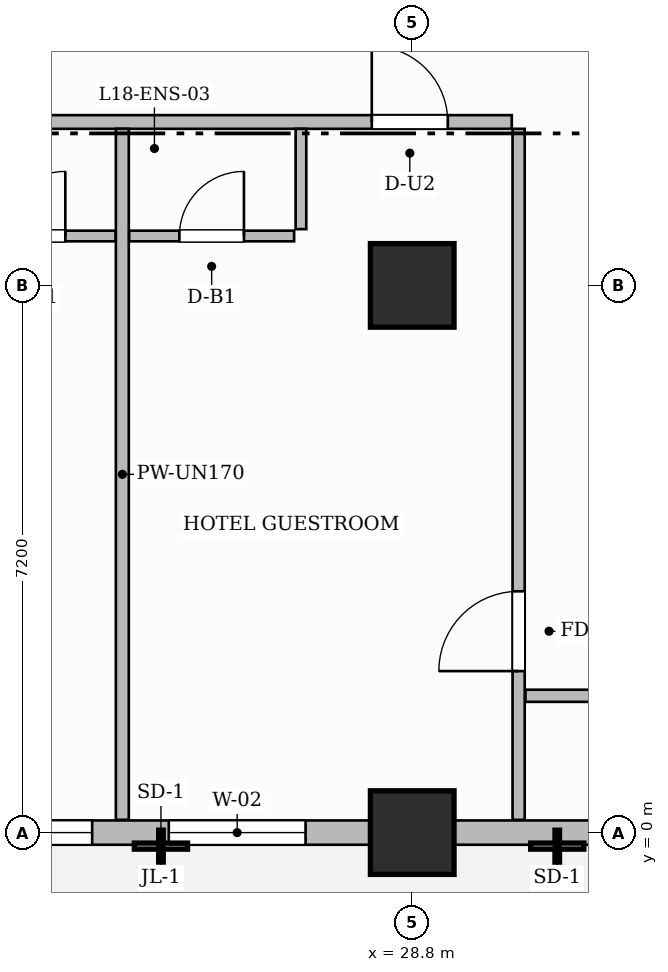
"""IFC4 building model, lengths in metres.
Left out: names, types, materials, properties, quantities, classifications, styles, units other than length and angle.
Written with IfcOpenShell. Run it as: python <this file> out.ifc"""

import sys

from ifc_helpers import new_model, si_unit, direction, frame, frame_2d, origin, origin_2d, place, context, subcontext, project, spatial, rectangle, extrude, source, transform, mapped, element, fill, save


model = new_model("IFC4")
c1 = context("Model", 3, precision=1e-05, world=origin(), true_north=direction((0.0, 1.0)))
c2 = subcontext(c1, "Body", "Model", "MODEL_VIEW")
j1 = project(units=[si_unit("LENGTHUNIT", "METRE"), si_unit("PLANEANGLEUNIT", "RADIAN")], contexts=[c1])
p1 = place(None, origin())
s1 = spatial("IfcSite", under=j1, at=p1, CompositionType="ELEMENT")
p2 = place(p1, origin())
s2 = spatial("IfcBuilding", under=s1, at=p2, CompositionType="ELEMENT")
p3 = place(p2, frame((0.0, 0.0, 76.8)))
s3 = spatial("IfcBuildingStorey", under=s2, at=p3, CompositionType="ELEMENT", Elevation=76.8)
m1 = source(origin(), c2, "Body", "SweptSolid", [
    extrude(rectangle(XDim=1.1, YDim=1.1, at=origin_2d()), origin(), (0.0, 0.0, 1.0), 3.7),
])
for number, where, z_axis, x_axis in (
    (1, (28.8, 0.0, 0.0), (0.0, 0.0, 1.0), (1.0, 0.0, 0.0)),
    (2, (28.8, 7.2, 0.0), (0.0, 0.0, 1.0), (1.0, 0.0, 0.0)),
):
    element("IfcColumn", number, at=place(p3, frame(where, z_axis=z_axis, x_axis=x_axis)), inside=s3, PredefinedType="COLUMN", context=c2, shape_type="MappedRepresentation", body=[
        mapped(m1, transform((0.0, 0.0, 0.0), scale=1.0)),
    ])
p4 = place(p3, frame((14.568, 9.35, 0.0), z_axis=(0.0, 0.0, 1.0), x_axis=(1.0, 0.0, 0.0)))
e3 = element("IfcWall", 3, at=p4, inside=s3, PredefinedType="PARTITIONING", context=c2, shape_type="SweptSolid", body=[
    extrude(rectangle(XDim=15.542, YDim=0.18, at=frame_2d((7.771, 0.0))), origin(), (0.0, 0.0, 1.0), 3.45),
])
p5 = place(p4, frame((2.888, 0.0, 0.0)))
e4 = element("IfcOpeningElement", 4, at=p5, cuts=e3, PredefinedType="OPENING", context=c2, shape_type="SweptSolid", body=[
    extrude(rectangle(XDim=1.0, YDim=2.2, at=frame_2d((0.5, 1.1))), frame((0.0, 0.1, 0.0), z_axis=(0.0, -1.0, 0.0), x_axis=(1.0, 0.0, 0.0)), (0.0, 0.0, 1.0), 0.2),
])
p6 = place(p4, frame((5.965, 0.0, 0.0)))
e5 = element("IfcOpeningElement", 5, at=p6, cuts=e3, PredefinedType="OPENING", context=c2, shape_type="SweptSolid", body=[
    extrude(rectangle(XDim=1.05, YDim=2.25, at=frame_2d((0.525, 1.125))), frame((0.0, 0.1, 0.0), z_axis=(0.0, -1.0, 0.0), x_axis=(1.0, 0.0, 0.0)), (0.0, 0.0, 1.0), 0.2),
])
p7 = place(p4, frame((13.7, 0.0, 0.0)))
e6 = element("IfcOpeningElement", 6, at=p7, cuts=e3, PredefinedType="OPENING", context=c2, shape_type="SweptSolid", body=[
    extrude(rectangle(XDim=1.0, YDim=2.2, at=frame_2d((0.5, 1.1))), frame((0.0, 0.1, 0.0), z_axis=(0.0, -1.0, 0.0), x_axis=(1.0, 0.0, 0.0)), (0.0, 0.0, 1.0), 0.2),
])
p8 = place(p3, frame((30.2, 0.168, 0.0), z_axis=(0.0, 0.0, 1.0), x_axis=(0.0, 1.0, 0.0)))
e7 = element("IfcWall", 7, at=p8, inside=s3, PredefinedType="PARTITIONING", context=c2, shape_type="SweptSolid", body=[
    extrude(rectangle(XDim=9.092, YDim=0.16, at=frame_2d((4.546, 0.0))), origin(), (0.0, 0.0, 1.0), 3.45),
])
p9 = place(p8, frame((1.957, 0.0, 0.0)))
e8 = element("IfcOpeningElement", 8, at=p9, cuts=e7, PredefinedType="OPENING", context=c2, shape_type="SweptSolid", body=[
    extrude(rectangle(XDim=1.05, YDim=2.15, at=frame_2d((0.525, 1.075))), frame((0.0, 0.09, 0.0), z_axis=(0.0, -1.0, 0.0), x_axis=(1.0, 0.0, 0.0)), (0.0, 0.0, 1.0), 0.18),
])
p10 = place(p3, frame((30.29, 1.8, 0.0), z_axis=(0.0, 0.0, 1.0), x_axis=(1.0, 0.0, 0.0)))
e9 = element("IfcWall", 9, at=p10, inside=s3, PredefinedType="PARTITIONING", context=c2, shape_type="SweptSolid", body=[
    extrude(rectangle(XDim=19.37, YDim=0.16, at=frame_2d((9.685, 0.0))), origin(), (0.0, 0.0, 1.0), 3.45),
])
p11 = place(p10, frame((2.916, 0.0, 0.0)))
e10 = element("IfcOpeningElement", 10, at=p11, cuts=e9, PredefinedType="OPENING", context=c2, shape_type="SweptSolid", body=[
    extrude(rectangle(XDim=0.9, YDim=2.15, at=frame_2d((0.45, 1.075))), frame((0.0, 0.09, 0.0), z_axis=(0.0, -1.0, 0.0), x_axis=(1.0, 0.0, 0.0)), (0.0, 0.0, 1.0), 0.18),
])
p12 = place(p10, frame((9.66, 0.0, 0.0)))
e11 = element("IfcOpeningElement", 11, at=p12, cuts=e9, PredefinedType="OPENING", context=c2, shape_type="SweptSolid", body=[
    extrude(rectangle(XDim=0.9, YDim=2.15, at=frame_2d((0.45, 1.075))), frame((0.0, 0.09, 0.0), z_axis=(0.0, -1.0, 0.0), x_axis=(1.0, 0.0, 0.0)), (0.0, 0.0, 1.0), 0.18),
])
p13 = place(p10, frame((15.86, 0.0, 0.0)))
e12 = element("IfcOpeningElement", 12, at=p13, cuts=e9, PredefinedType="OPENING", context=c2, shape_type="SweptSolid", body=[
    extrude(rectangle(XDim=0.9, YDim=2.15, at=frame_2d((0.45, 1.075))), frame((0.0, 0.09, 0.0), z_axis=(0.0, -1.0, 0.0), x_axis=(1.0, 0.0, 0.0)), (0.0, 0.0, 1.0), 0.18),
])
p14 = place(p3, frame((24.986, 0.168, 0.0), z_axis=(0.0, 0.0, 1.0), x_axis=(0.0, 1.0, 0.0)))
e13 = element("IfcWall", 13, at=p14, inside=s3, PredefinedType="PARTITIONING", context=c2, shape_type="SweptSolid", body=[
    extrude(rectangle(XDim=9.092, YDim=0.17, at=frame_2d((4.546, 0.0))), origin(), (0.0, 0.0, 1.0), 3.075),
])
p15 = place(p3, frame((22.726, 7.85, 0.0), z_axis=(0.0, 0.0, 1.0), x_axis=(1.0, 0.0, 0.0)))
e14 = element("IfcWall", 14, at=p15, inside=s3, PredefinedType="PARTITIONING", context=c2, shape_type="SweptSolid", body=[
    extrude(rectangle(XDim=2.17, YDim=0.14, at=frame_2d((1.085, 0.0))), origin(), (0.0, 0.0, 1.0), 3.45),
])
p16 = place(p15, frame((0.66, 0.0, 0.0)))
e15 = element("IfcOpeningElement", 15, at=p16, cuts=e14, PredefinedType="OPENING", context=c2, shape_type="SweptSolid", body=[
    extrude(rectangle(XDim=0.85, YDim=2.1, at=frame_2d((0.425, 1.05))), frame((0.0, 0.08, 0.0), z_axis=(0.0, -1.0, 0.0), x_axis=(1.0, 0.0, 0.0)), (0.0, 0.0, 1.0), 0.16),
])
p17 = place(p3, frame((27.336, 7.94, 0.0), z_axis=(0.0, 0.0, 1.0), x_axis=(0.0, 1.0, 0.0)))
e16 = element("IfcWall", 16, at=p17, inside=s3, PredefinedType="PARTITIONING", context=c2, shape_type="SweptSolid", body=[
    extrude(rectangle(XDim=1.32, YDim=0.14, at=frame_2d((0.66, 0.0))), origin(), (0.0, 0.0, 1.0), 3.45),
])
p18 = place(p3, frame((25.076, 7.85, 0.0), z_axis=(0.0, 0.0, 1.0), x_axis=(1.0, 0.0, 0.0)))
e17 = element("IfcWall", 17, at=p18, inside=s3, PredefinedType="PARTITIONING", context=c2, shape_type="SweptSolid", body=[
    extrude(rectangle(XDim=2.17, YDim=0.14, at=frame_2d((1.085, 0.0))), origin(), (0.0, 0.0, 1.0), 3.45),
])
p19 = place(p18, frame((0.66, 0.0, 0.0)))
e18 = element("IfcOpeningElement", 18, at=p19, cuts=e17, PredefinedType="OPENING", context=c2, shape_type="SweptSolid", body=[
    extrude(rectangle(XDim=0.85, YDim=2.1, at=frame_2d((0.425, 1.05))), frame((0.0, 0.08, 0.0), z_axis=(0.0, -1.0, 0.0), x_axis=(1.0, 0.0, 0.0)), (0.0, 0.0, 1.0), 0.16),
])
p20 = place(p3, frame((14.4, 0.0, 0.0), z_axis=(0.0, 0.0, 1.0), x_axis=(1.0, 0.0, 0.0)))
e19 = element("IfcWall", 19, at=p20, inside=s3, PredefinedType="SOLIDWALL", context=c2, shape_type="SweptSolid", body=[
    extrude(rectangle(XDim=43.2, YDim=0.32, at=frame_2d((21.6, 0.0))), origin(), (0.0, 0.0, 1.0), 2.885),
])
p21 = place(p20, frame((0.85, 0.0, 0.0)))
e20 = element("IfcOpeningElement", 20, at=p21, cuts=e19, PredefinedType="OPENING", context=c2, shape_type="SweptSolid", body=[
    extrude(rectangle(XDim=1.2, YDim=2.2, at=frame_2d((0.6, 1.1))), frame((0.0, 0.17, 0.0), z_axis=(0.0, -1.0, 0.0), x_axis=(1.0, 0.0, 0.0)), (0.0, 0.0, 1.0), 0.34),
])
p22 = place(p20, frame((2.811, 0.0, 0.8)))
e21 = element("IfcOpeningElement", 21, at=p22, cuts=e19, PredefinedType="OPENING", context=c2, shape_type="SweptSolid", body=[
    extrude(rectangle(XDim=1.8, YDim=1.85, at=frame_2d((0.9, 0.925))), frame((0.0, 0.17, 0.0), z_axis=(0.0, -1.0, 0.0), x_axis=(1.0, 0.0, 0.0)), (0.0, 0.0, 1.0), 0.34),
])
p23 = place(p20, frame((5.269, 0.0, 0.8)))
e22 = element("IfcOpeningElement", 22, at=p23, cuts=e19, PredefinedType="OPENING", context=c2, shape_type="SweptSolid", body=[
    extrude(rectangle(XDim=0.95, YDim=1.75, at=frame_2d((0.475, 0.875))), frame((0.0, 0.17, 0.0), z_axis=(0.0, -1.0, 0.0), x_axis=(1.0, 0.0, 0.0)), (0.0, 0.0, 1.0), 0.34),
])
p24 = place(p20, frame((8.389, 0.0, 0.8)))
e23 = element("IfcOpeningElement", 23, at=p24, cuts=e19, PredefinedType="OPENING", context=c2, shape_type="SweptSolid", body=[
    extrude(rectangle(XDim=1.8, YDim=1.85, at=frame_2d((0.9, 0.925))), frame((0.0, 0.17, 0.0), z_axis=(0.0, -1.0, 0.0), x_axis=(1.0, 0.0, 0.0)), (0.0, 0.0, 1.0), 0.34),
])
p25 = place(p20, frame((11.197, 0.0, 0.8)))
e24 = element("IfcOpeningElement", 24, at=p25, cuts=e19, PredefinedType="OPENING", context=c2, shape_type="SweptSolid", body=[
    extrude(rectangle(XDim=1.8, YDim=1.85, at=frame_2d((0.9, 0.925))), frame((0.0, 0.17, 0.0), z_axis=(0.0, -1.0, 0.0), x_axis=(1.0, 0.0, 0.0)), (0.0, 0.0, 1.0), 0.34),
])
p26 = place(p20, frame((16.804, 0.0, 0.8)))
e25 = element("IfcOpeningElement", 25, at=p26, cuts=e19, PredefinedType="OPENING", context=c2, shape_type="SweptSolid", body=[
    extrude(rectangle(XDim=1.8, YDim=1.85, at=frame_2d((0.9, 0.925))), frame((0.0, 0.17, 0.0), z_axis=(0.0, -1.0, 0.0), x_axis=(1.0, 0.0, 0.0)), (0.0, 0.0, 1.0), 0.34),
])
p27 = place(p20, frame((21.521, 0.0, 0.8)))
e26 = element("IfcOpeningElement", 26, at=p27, cuts=e19, PredefinedType="OPENING", context=c2, shape_type="SweptSolid", body=[
    extrude(rectangle(XDim=0.95, YDim=1.75, at=frame_2d((0.475, 0.875))), frame((0.0, 0.17, 0.0), z_axis=(0.0, -1.0, 0.0), x_axis=(1.0, 0.0, 0.0)), (0.0, 0.0, 1.0), 0.34),
])
p28 = place(p20, frame((23.904, 0.0, 0.8)))
e27 = element("IfcOpeningElement", 27, at=p28, cuts=e19, PredefinedType="OPENING", context=c2, shape_type="SweptSolid", body=[
    extrude(rectangle(XDim=1.8, YDim=1.85, at=frame_2d((0.9, 0.925))), frame((0.0, 0.17, 0.0), z_axis=(0.0, -1.0, 0.0), x_axis=(1.0, 0.0, 0.0)), (0.0, 0.0, 1.0), 0.34),
])
p29 = place(p20, frame((29.681, 0.0, 0.8)))
e28 = element("IfcOpeningElement", 28, at=p29, cuts=e19, PredefinedType="OPENING", context=c2, shape_type="SweptSolid", body=[
    extrude(rectangle(XDim=1.8, YDim=1.85, at=frame_2d((0.9, 0.925))), frame((0.0, 0.17, 0.0), z_axis=(0.0, -1.0, 0.0), x_axis=(1.0, 0.0, 0.0)), (0.0, 0.0, 1.0), 0.34),
])
p30 = place(p20, frame((32.327, 0.0, 0.8)))
e29 = element("IfcOpeningElement", 29, at=p30, cuts=e19, PredefinedType="OPENING", context=c2, shape_type="SweptSolid", body=[
    extrude(rectangle(XDim=1.8, YDim=1.85, at=frame_2d((0.9, 0.925))), frame((0.0, 0.17, 0.0), z_axis=(0.0, -1.0, 0.0), x_axis=(1.0, 0.0, 0.0)), (0.0, 0.0, 1.0), 0.34),
])
p31 = place(p20, frame((36.875, 0.0, 0.8)))
e30 = element("IfcOpeningElement", 30, at=p31, cuts=e19, PredefinedType="OPENING", context=c2, shape_type="SweptSolid", body=[
    extrude(rectangle(XDim=1.8, YDim=1.85, at=frame_2d((0.9, 0.925))), frame((0.0, 0.17, 0.0), z_axis=(0.0, -1.0, 0.0), x_axis=(1.0, 0.0, 0.0)), (0.0, 0.0, 1.0), 0.34),
])
p32 = place(p20, frame((39.925, 0.0, 0.8)))
e31 = element("IfcOpeningElement", 31, at=p32, cuts=e19, PredefinedType="OPENING", context=c2, shape_type="SweptSolid", body=[
    extrude(rectangle(XDim=1.8, YDim=1.85, at=frame_2d((0.9, 0.925))), frame((0.0, 0.17, 0.0), z_axis=(0.0, -1.0, 0.0), x_axis=(1.0, 0.0, 0.0)), (0.0, 0.0, 1.0), 0.34),
])
m2 = source(origin(), c2, "Body", "SweptSolid", [
    extrude(rectangle(XDim=1.05, YDim=2.15, at=frame_2d((0.525, 1.075))), frame((0.0, 0.025, 0.0), z_axis=(0.0, -1.0, 0.0), x_axis=(1.0, 0.0, 0.0)), (0.0, 0.0, 1.0), 0.05),
])
p33 = place(p9, origin())
e32 = element("IfcDoor", 32, at=p33, inside=s3, OperationType="SINGLE_SWING_LEFT", PredefinedType="DOOR", context=c2, shape_type="MappedRepresentation", body=[
    mapped(m2, transform((0.0, 0.0, 0.0), scale=1.0)),
])
fill(e8, e32)
m3 = source(origin(), c2, "Body", "SweptSolid", [
    extrude(rectangle(XDim=0.85, YDim=2.1, at=frame_2d((0.425, 1.05))), frame((0.0, 0.025, 0.0), z_axis=(0.0, -1.0, 0.0), x_axis=(1.0, 0.0, 0.0)), (0.0, 0.0, 1.0), 0.05),
])
p34 = place(p16, origin())
e33 = element("IfcDoor", 33, at=p34, inside=s3, OperationType="SINGLE_SWING_RIGHT", PredefinedType="DOOR", context=c2, shape_type="MappedRepresentation", body=[
    mapped(m3, transform((0.0, 0.0, 0.0), scale=1.0)),
])
fill(e15, e33)
p35 = place(p19, origin())
e34 = element("IfcDoor", 34, at=p35, inside=s3, OperationType="SINGLE_SWING_RIGHT", PredefinedType="DOOR", context=c2, shape_type="MappedRepresentation", body=[
    mapped(m3, transform((0.0, 0.0, 0.0), scale=1.0)),
])
fill(e18, e34)
m4 = source(origin(), c2, "Body", "SweptSolid", [
    extrude(rectangle(XDim=1.0, YDim=2.2, at=frame_2d((0.5, 1.1))), frame((0.0, 0.025, 0.0), z_axis=(0.0, -1.0, 0.0), x_axis=(1.0, 0.0, 0.0)), (0.0, 0.0, 1.0), 0.05),
])
p36 = place(p7, origin())
e35 = element("IfcDoor", 35, at=p36, inside=s3, OperationType="SINGLE_SWING_LEFT", PredefinedType="DOOR", context=c2, shape_type="MappedRepresentation", body=[
    mapped(m4, transform((0.0, 0.0, 0.0), scale=1.0)),
])
fill(e6, e35)
m5 = source(origin(), c2, "Body", "SweptSolid", [
    extrude(rectangle(XDim=1.8, YDim=1.85, at=frame_2d((0.9, 0.925))), frame((0.0, 0.03, 0.0), z_axis=(0.0, -1.0, 0.0), x_axis=(1.0, 0.0, 0.0)), (0.0, 0.0, 1.0), 0.06),
])
p37 = place(p24, origin())
e36 = element("IfcWindow", 36, at=p37, inside=s3, PartitioningType="DOUBLE_PANEL_VERTICAL", PredefinedType="WINDOW", context=c2, shape_type="MappedRepresentation", body=[
    mapped(m5, transform((0.0, 0.0, 0.0), scale=1.0)),
])
fill(e23, e36)
p38 = place(p25, origin())
e37 = element("IfcWindow", 37, at=p38, inside=s3, PartitioningType="DOUBLE_PANEL_VERTICAL", PredefinedType="WINDOW", context=c2, shape_type="MappedRepresentation", body=[
    mapped(m5, transform((0.0, 0.0, 0.0), scale=1.0)),
])
fill(e24, e37)
save(model, sys.argv[1])
